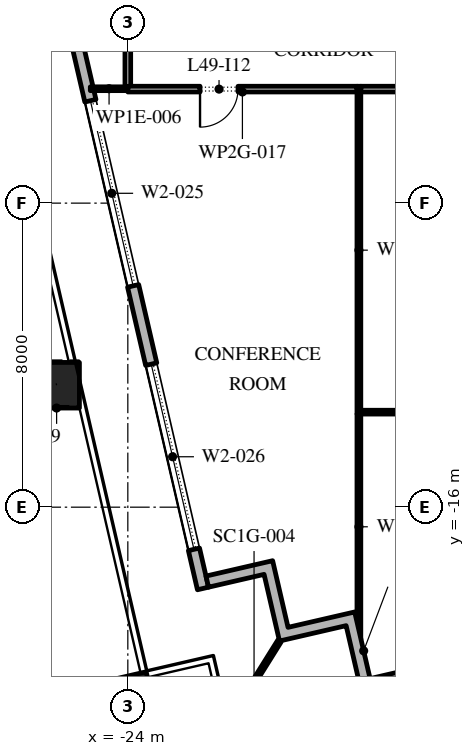
"""IFC4 building model, lengths in metres.
Left out: names, types, materials, properties, quantities, classifications, styles, units other than length and angle.
Written with IfcOpenShell. Run it as: python <this file> out.ifc"""

import sys

from ifc_helpers import new_model, si_unit, direction, frame, frame_2d, origin, origin_2d, place, context, subcontext, project, spatial, polyline, rectangle, outline, extrude, element, fill, save


model = new_model("IFC4")
c1 = context("Model", 3, precision=1e-05, world=origin(), true_north=direction((0.0, 1.0)))
c2 = subcontext(c1, "Body", "Model", "MODEL_VIEW")
j1 = project(units=[si_unit("LENGTHUNIT", "METRE"), si_unit("PLANEANGLEUNIT", "RADIAN")], contexts=[c1])
p1 = place(None, origin())
s1 = spatial("IfcSite", under=j1, at=p1, CompositionType="ELEMENT")
p2 = place(p1, origin())
s2 = spatial("IfcBuilding", under=s1, at=p2, CompositionType="ELEMENT")
p3 = place(p2, frame((0.0, 0.0, 222.0)))
s3 = spatial("IfcBuildingStorey", under=s2, at=p3, CompositionType="ELEMENT", Elevation=222.0)
p4 = place(p3, frame((-25.874, -12.792, 0.0), z_axis=(-0.00267376016, 0.011683169396, 0.9999281747), x_axis=(-0.974798272484, -0.223088161862, 0.0)))
e1 = element("IfcColumn", 1, at=p4, inside=s3, PredefinedType="COLUMN", context=c2, shape_type="SweptSolid", body=[
    extrude(rectangle(XDim=1.2, YDim=1.2, at=origin_2d()), origin(), (0.0, 0.0, 1.0), 4.2),
])
p5 = place(p3, frame((-23.967, -21.051, 0.0), z_axis=(0.0, 0.0, 1.0), x_axis=(0.974370064785, 0.224951054344, 0.0)))
e2 = element("IfcColumn", 2, at=p5, inside=s3, PredefinedType="COLUMN", context=c2, shape_type="SweptSolid", body=[
    extrude(rectangle(XDim=1.2, YDim=1.2, at=origin_2d()), origin(), (0.0, 0.0, 1.0), 4.2),
])
p6 = place(p3, frame((-17.592, -20.657, 0.0), z_axis=(0.0, 0.0, 1.0), x_axis=(0.974371132389, 0.224946429994, 0.0)))
e3 = element("IfcWall", 3, at=p6, inside=s3, PredefinedType="STANDARD", context=c2, shape_type="SweptSolid", body=[
    extrude(rectangle(XDim=8.0, YDim=0.3, at=frame_2d((4.0, 0.0))), origin(), (0.0, 0.0, 1.0), 3.75),
])
p7 = place(p6, frame((2.8, 0.0, 0.0)))
e4 = element("IfcOpeningElement", 4, at=p7, cuts=e3, PredefinedType="OPENING", context=c2, shape_type="SweptSolid", body=[
    extrude(rectangle(XDim=2.4, YDim=2.7, at=frame_2d((1.2, 1.35))), frame((0.0, 0.16, 0.0), z_axis=(0.0, -1.0, 0.0), x_axis=(1.0, 0.0, 0.0)), (0.0, 0.0, 1.0), 0.32),
])
p8 = place(p3, frame((-33.157, 30.092, 0.0), z_axis=(0.0, 0.0, 1.0), x_axis=(0.224950279389, -0.974370243697, 0.0)))
e5 = element("IfcWall", 5, at=p8, inside=s3, PredefinedType="STANDARD", context=c2, shape_type="SweptSolid", body=[
    extrude(rectangle(XDim=49.5, YDim=0.3, at=frame_2d((24.75, 0.0))), origin(), (0.0, 0.0, 1.0), 3.75),
])
p9 = place(p8, frame((2.207, 0.0, 0.0)))
e6 = element("IfcOpeningElement", 6, at=p9, cuts=e5, PredefinedType="OPENING", context=c2, shape_type="SweptSolid", body=[
    extrude(rectangle(XDim=2.4, YDim=3.5, at=frame_2d((1.2, 1.75))), frame((0.0, 0.16, 0.0), z_axis=(0.0, -1.0, 0.0), x_axis=(1.0, 0.0, 0.0)), (0.0, 0.0, 1.0), 0.32),
])
p10 = place(p8, frame((7.871, 0.0, 0.45)))
e7 = element("IfcOpeningElement", 7, at=p10, cuts=e5, PredefinedType="OPENING", context=c2, shape_type="SweptSolid", body=[
    extrude(rectangle(XDim=5.0, YDim=2.575, at=frame_2d((2.5, 1.288))), frame((0.0, 0.16, 0.0), z_axis=(0.0, -1.0, 0.0), x_axis=(1.0, 0.0, 0.0)), (0.0, 0.0, 1.0), 0.32),
])
p11 = place(p8, frame((14.986, 0.0, 0.45)))
e8 = element("IfcOpeningElement", 8, at=p11, cuts=e5, PredefinedType="OPENING", context=c2, shape_type="SweptSolid", body=[
    extrude(rectangle(XDim=5.0, YDim=3.25, at=frame_2d((2.5, 1.625))), frame((0.0, 0.16, 0.0), z_axis=(0.0, -1.0, 0.0), x_axis=(1.0, 0.0, 0.0)), (0.0, 0.0, 1.0), 0.32),
])
p12 = place(p8, frame((22.1, 0.0, 0.45)))
e9 = element("IfcOpeningElement", 9, at=p12, cuts=e5, PredefinedType="OPENING", context=c2, shape_type="SweptSolid", body=[
    extrude(rectangle(XDim=5.0, YDim=2.75, at=frame_2d((2.5, 1.375))), frame((0.0, 0.16, 0.0), z_axis=(0.0, -1.0, 0.0), x_axis=(1.0, 0.0, 0.0)), (0.0, 0.0, 1.0), 0.32),
])
p13 = place(p8, frame((30.514, 0.0, 0.0)))
e10 = element("IfcOpeningElement", 10, at=p13, cuts=e5, PredefinedType="OPENING", context=c2, shape_type="SweptSolid", body=[
    extrude(rectangle(XDim=2.4, YDim=3.5, at=frame_2d((1.2, 1.75))), frame((0.0, 0.16, 0.0), z_axis=(0.0, -1.0, 0.0), x_axis=(1.0, 0.0, 0.0)), (0.0, 0.0, 1.0), 0.32),
])
p14 = place(p8, frame((36.329, 0.0, 0.45)))
e11 = element("IfcOpeningElement", 11, at=p14, cuts=e5, PredefinedType="OPENING", context=c2, shape_type="SweptSolid", body=[
    extrude(rectangle(XDim=5.0, YDim=3.25, at=frame_2d((2.5, 1.625))), frame((0.0, 0.16, 0.0), z_axis=(0.0, -1.0, 0.0), x_axis=(1.0, 0.0, 0.0)), (0.0, 0.0, 1.0), 0.32),
])
p15 = place(p8, frame((43.443, 0.0, 0.45)))
e12 = element("IfcOpeningElement", 12, at=p15, cuts=e5, PredefinedType="OPENING", context=c2, shape_type="SweptSolid", body=[
    extrude(rectangle(XDim=5.0, YDim=3.25, at=frame_2d((2.5, 1.625))), frame((0.0, 0.16, 0.0), z_axis=(0.0, -1.0, 0.0), x_axis=(1.0, 0.0, 0.0)), (0.0, 0.0, 1.0), 0.32),
])
p16 = place(p3, origin())
e13 = element("IfcWall", 13, at=p16, inside=s3, PredefinedType="STANDARD", context=c2, shape_type="SweptSolid", body=[
    extrude(outline(polyline([(-18.256, -19.117), (-20.01, -19.522), (-20.414, -17.768), (-21.876, -18.105), (-21.943, -17.813), (-20.19, -17.408), (-19.785, -19.162), (-18.031, -18.757), (-17.558, -20.803), (-17.851, -20.871), (-18.256, -19.117)])), origin(), (0.0, 0.0, 1.0), 3.75),
])
p17 = place(p3, frame((-20.01, -19.522, -0.05), z_axis=(0.0, 0.0, 1.0), x_axis=(-0.529920736377, -0.848047176257, 0.0)))
e14 = element("IfcWall", 14, at=p17, inside=s3, PredefinedType="STANDARD", context=c2, shape_type="SweptSolid", body=[
    extrude(rectangle(XDim=2.526, YDim=0.1, at=frame_2d((1.263, 0.0))), origin(), (0.0, 0.0, 1.0), 3.8),
])
p18 = place(p3, frame((-24.0, -4.99, 0.0), z_axis=(0.0, 0.0, 1.0), x_axis=(-1.0, 0.0, 0.0)))
e15 = element("IfcWall", 15, at=p18, inside=s3, PredefinedType="PARTITIONING", context=c2, shape_type="SweptSolid", body=[
    extrude(rectangle(XDim=0.987, YDim=0.1, at=frame_2d((0.494, 0.0))), origin(), (0.0, 0.0, 1.0), 3.75),
])
p19 = place(p3, frame((-24.0, -4.94, 0.0), z_axis=(0.0, 0.0, 1.0), x_axis=(0.0, 1.0, 0.0)))
e16 = element("IfcWall", 16, at=p19, inside=s3, PredefinedType="PARTITIONING", context=c2, shape_type="SweptSolid", body=[
    extrude(rectangle(XDim=14.51, YDim=0.15, at=frame_2d((7.255, 0.0))), origin(), (0.0, 0.0, 1.0), 3.75),
])
p20 = place(p19, frame((5.41, 0.0, 0.0)))
e17 = element("IfcOpeningElement", 17, at=p20, cuts=e16, PredefinedType="OPENING", context=c2, shape_type="SweptSolid", body=[
    extrude(rectangle(XDim=1.0, YDim=2.1, at=frame_2d((0.5, 1.05))), frame((0.0, 0.085, 0.0), z_axis=(0.0, -1.0, 0.0), x_axis=(1.0, 0.0, 0.0)), (0.0, 0.0, 1.0), 0.17),
])
p21 = place(p3, frame((-17.92, -19.482, 0.0), z_axis=(0.0, 0.0, 1.0), x_axis=(0.0, 1.0, 0.0)))
e18 = element("IfcWall", 18, at=p21, inside=s3, PredefinedType="PARTITIONING", context=c2, shape_type="SweptSolid", body=[
    extrude(rectangle(XDim=5.932, YDim=0.1, at=frame_2d((2.966, 0.0))), origin(), (0.0, 0.0, 1.0), 3.75),
])
p22 = place(p3, frame((-17.92, -13.55, 0.0), z_axis=(0.0, 0.0, 1.0), x_axis=(0.0, 1.0, 0.0)))
e19 = element("IfcWall", 19, at=p22, inside=s3, PredefinedType="PARTITIONING", context=c2, shape_type="SweptSolid", body=[
    extrude(rectangle(XDim=8.625, YDim=0.1, at=frame_2d((4.312, 0.0))), origin(), (0.0, 0.0, 1.0), 3.75),
])
p23 = place(p3, frame((-17.87, -13.5, 0.0), z_axis=(0.0, 0.0, 1.0), x_axis=(1.0, 0.0, 0.0)))
e20 = element("IfcWall", 20, at=p23, inside=s3, PredefinedType="PARTITIONING", context=c2, shape_type="SweptSolid", body=[
    extrude(rectangle(XDim=6.37, YDim=0.1, at=frame_2d((3.185, 0.0))), origin(), (0.0, 0.0, 1.0), 3.75),
])
p24 = place(p3, frame((-17.97, -5.0, 0.0), z_axis=(0.0, 0.0, 1.0), x_axis=(-1.0, 0.0, 0.0)))
e21 = element("IfcWall", 21, at=p24, inside=s3, PredefinedType="PARTITIONING", context=c2, shape_type="SweptSolid", body=[
    extrude(rectangle(XDim=6.03, YDim=0.15, at=frame_2d((3.015, 0.0))), origin(), (0.0, 0.0, 1.0), 3.75),
])
p25 = place(p24, frame((3.13, 0.0, 0.0)))
e22 = element("IfcOpeningElement", 22, at=p25, cuts=e21, PredefinedType="OPENING", context=c2, shape_type="SweptSolid", body=[
    extrude(rectangle(XDim=1.0, YDim=2.1, at=frame_2d((0.5, 1.05))), frame((0.0, 0.085, 0.0), z_axis=(0.0, -1.0, 0.0), x_axis=(1.0, 0.0, 0.0)), (0.0, 0.0, 1.0), 0.17),
])
p26 = place(p3, frame((-11.55, -5.0, 0.0), z_axis=(0.0, 0.0, 1.0), x_axis=(-1.0, 0.0, 0.0)))
e23 = element("IfcWall", 23, at=p26, inside=s3, PredefinedType="PARTITIONING", context=c2, shape_type="SweptSolid", body=[
    extrude(rectangle(XDim=6.32, YDim=0.15, at=frame_2d((3.16, 0.0))), origin(), (0.0, 0.0, 1.0), 3.75),
])
p27 = place(p26, frame((2.72, 0.0, 0.0)))
e24 = element("IfcOpeningElement", 24, at=p27, cuts=e23, PredefinedType="OPENING", context=c2, shape_type="SweptSolid", body=[
    extrude(rectangle(XDim=1.0, YDim=2.1, at=frame_2d((0.5, 1.05))), frame((0.0, 0.085, 0.0), z_axis=(0.0, -1.0, 0.0), x_axis=(1.0, 0.0, 0.0)), (0.0, 0.0, 1.0), 0.17),
])
p28 = place(p14, origin())
e25 = element("IfcWindow", 25, at=p28, inside=s3, PartitioningType="DOUBLE_PANEL_VERTICAL", PredefinedType="WINDOW", context=c2, shape_type="SweptSolid", body=[
    extrude(rectangle(XDim=5.0, YDim=3.25, at=frame_2d((2.5, 1.625))), frame((0.0, 0.03, 0.0), z_axis=(0.0, -1.0, 0.0), x_axis=(1.0, 0.0, 0.0)), (0.0, 0.0, 1.0), 0.06),
])
fill(e11, e25)
p29 = place(p15, origin())
e26 = element("IfcWindow", 26, at=p29, inside=s3, PartitioningType="DOUBLE_PANEL_VERTICAL", PredefinedType="WINDOW", context=c2, shape_type="SweptSolid", body=[
    extrude(rectangle(XDim=5.0, YDim=3.25, at=frame_2d((2.5, 1.625))), frame((0.0, 0.03, 0.0), z_axis=(0.0, -1.0, 0.0), x_axis=(1.0, 0.0, 0.0)), (0.0, 0.0, 1.0), 0.06),
])
fill(e12, e26)
p30 = place(p25, origin())
e27 = element("IfcDoor", 27, at=p30, inside=s3, OperationType="SINGLE_SWING_LEFT", PredefinedType="DOOR", context=c2, shape_type="SweptSolid", body=[
    extrude(rectangle(XDim=1.0, YDim=2.1, at=frame_2d((0.5, 1.05))), frame((0.0, 0.025, 0.0), z_axis=(0.0, -1.0, 0.0), x_axis=(1.0, 0.0, 0.0)), (0.0, 0.0, 1.0), 0.05),
])
fill(e22, e27)
save(model, sys.argv[1])
